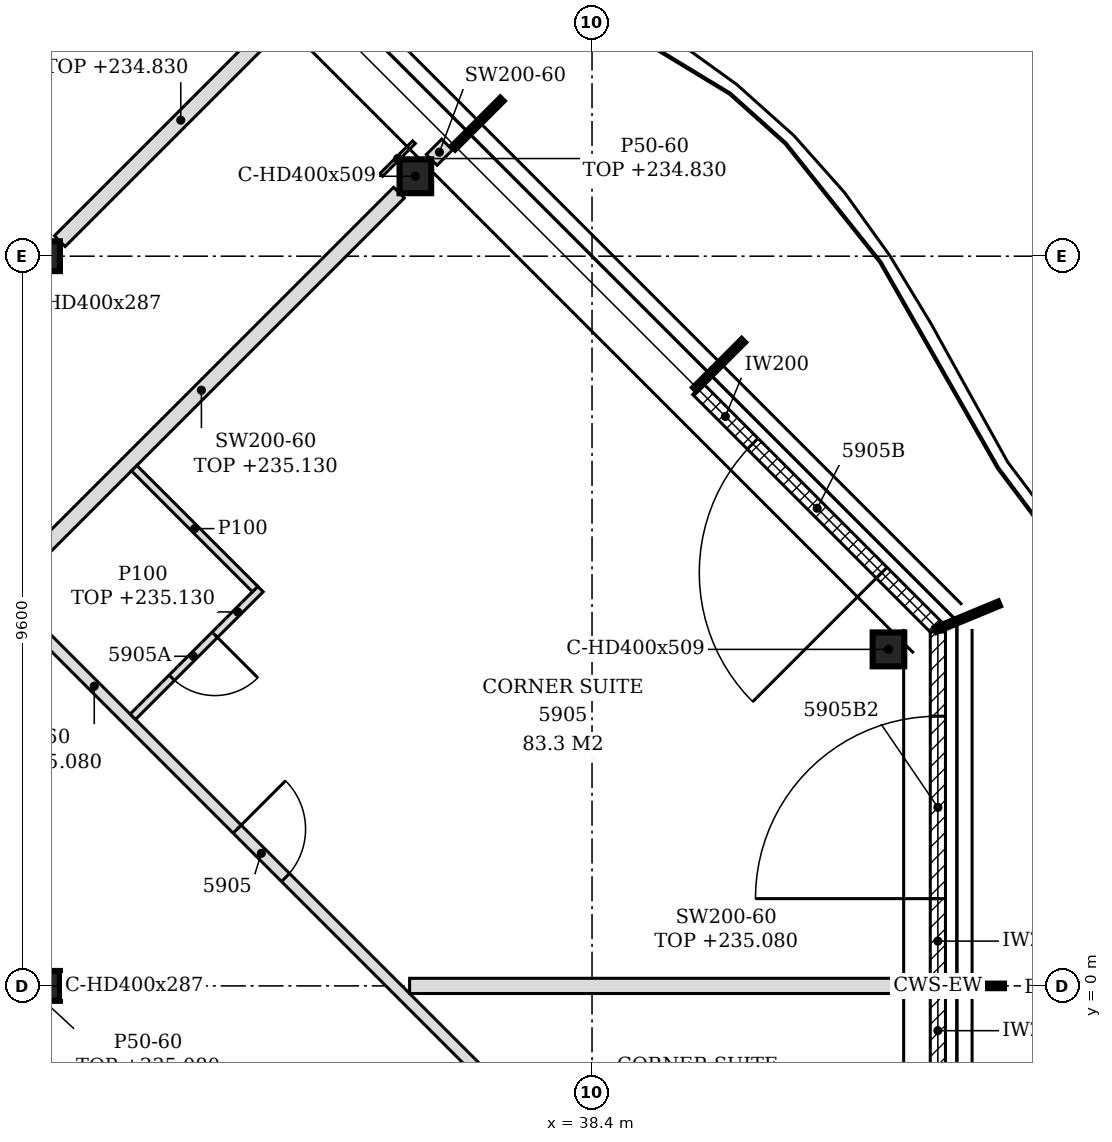
"""IFC4 building model, lengths in metres.
Left out: names, types, materials, properties, quantities, classifications, styles, units other than length and angle.
Written with IfcOpenShell. Run it as: python <this file> out.ifc"""

import sys

from ifc_helpers import new_model, si_unit, direction, frame, frame_2d, origin, origin_2d, place, context, subcontext, project, spatial, rectangle, i_section, extrude, element, fill, save


model = new_model("IFC4")
c1 = context("Model", 3, precision=1e-05, world=origin(), true_north=direction((0.0, 1.0)))
c2 = subcontext(c1, "Body", "Model", "MODEL_VIEW")
j1 = project(units=[si_unit("LENGTHUNIT", "METRE"), si_unit("PLANEANGLEUNIT", "RADIAN")], contexts=[c1])
p1 = place(None, origin())
s1 = spatial("IfcSite", under=j1, at=p1, CompositionType="ELEMENT")
p2 = place(p1, origin())
s2 = spatial("IfcBuilding", under=s1, at=p2, CompositionType="ELEMENT")
p3 = place(p2, frame((0.0, 0.0, 232.2)))
s3 = spatial("IfcBuildingStorey", under=s2, at=p3, CompositionType="ELEMENT", Elevation=232.2)
for number, where, z_axis, x_axis in (
    (1, (42.3, 4.427, -0.15), (0.0, 0.0, 1.0), (1.0, 0.0, 0.0)),
    (2, (36.076, 10.652, -0.15), (0.0, 0.0, 1.0), (1.0, 0.0, 0.0)),
):
    element("IfcColumn", number, at=place(p3, frame(where, z_axis=z_axis, x_axis=x_axis)), inside=s3, PredefinedType="COLUMN", context=c2, shape_type="SweptSolid", body=[
        extrude(i_section(OverallWidth=0.416, OverallDepth=0.446, WebThickness=0.039, FlangeThickness=0.063, FilletRadius=0.015, at=origin_2d()), origin(), (0.0, 0.0, 1.0), 3.6),
    ])
for number, where, z_axis, x_axis in (
    (3, (31.2, 0.0, -0.15), (0.0, 0.0, 1.0), (1.0, 0.0, 0.0)),
    (4, (31.2, 9.6, -0.15), (0.0, 0.0, 1.0), (1.0, 0.0, 0.0)),
):
    element("IfcColumn", number, at=place(p3, frame(where, z_axis=z_axis, x_axis=x_axis)), inside=s3, PredefinedType="COLUMN", context=c2, shape_type="SweptSolid", body=[
        extrude(i_section(OverallWidth=0.399, OverallDepth=0.393, WebThickness=0.023, FlangeThickness=0.037, FilletRadius=0.015, at=origin_2d()), origin(), (0.0, 0.0, 1.0), 3.6),
    ])
p4 = place(p3, frame((42.95, -4.656, 0.0), z_axis=(0.0, 0.0, 1.0), x_axis=(0.0, 1.0, 0.0)))
e5 = element("IfcWall", 5, at=p4, inside=s3, PredefinedType="NOTDEFINED", context=c2, shape_type="SweptSolid", body=[
    extrude(rectangle(XDim=4.626, YDim=0.2, at=frame_2d((2.313, 0.0))), origin(), (0.0, 0.0, 1.0), 3.45),
])
p5 = place(p4, frame((1.108, 0.0, 0.0)))
e6 = element("IfcOpeningElement", 6, at=p5, cuts=e5, PredefinedType="OPENING", context=c2, shape_type="SweptSolid", body=[
    extrude(rectangle(XDim=2.4, YDim=2.4, at=frame_2d((1.2, 1.2))), frame((0.0, 0.11, 0.0), z_axis=(0.0, -1.0, 0.0), x_axis=(1.0, 0.0, 0.0)), (0.0, 0.0, 1.0), 0.22),
])
p6 = place(p3, frame((42.95, 0.03, 0.0), z_axis=(0.0, 0.0, 1.0), x_axis=(0.0, 1.0, 0.0)))
e7 = element("IfcWall", 7, at=p6, inside=s3, PredefinedType="NOTDEFINED", context=c2, shape_type="SweptSolid", body=[
    extrude(rectangle(XDim=4.626, YDim=0.2, at=frame_2d((2.313, 0.0))), origin(), (0.0, 0.0, 1.0), 3.45),
])
p7 = place(p6, frame((1.118, 0.0, 0.0)))
e8 = element("IfcOpeningElement", 8, at=p7, cuts=e7, PredefinedType="OPENING", context=c2, shape_type="SweptSolid", body=[
    extrude(rectangle(XDim=2.4, YDim=2.4, at=frame_2d((1.2, 1.2))), frame((0.0, 0.11, 0.0), z_axis=(0.0, -1.0, 0.0), x_axis=(1.0, 0.0, 0.0)), (0.0, 0.0, 1.0), 0.22),
])
p8 = place(p3, frame((42.922, 4.725, 0.0), z_axis=(0.0, 0.0, 1.0), x_axis=(-0.707079168996, 0.707134392299, 0.0)))
e9 = element("IfcWall", 9, at=p8, inside=s3, PredefinedType="NOTDEFINED", context=c2, shape_type="SweptSolid", body=[
    extrude(rectangle(XDim=4.421, YDim=0.2, at=frame_2d((2.21, 0.0))), origin(), (0.0, 0.0, 1.0), 3.45),
])
p9 = place(p8, frame((1.005, 0.0, 0.0)))
e10 = element("IfcOpeningElement", 10, at=p9, cuts=e9, PredefinedType="OPENING", context=c2, shape_type="SweptSolid", body=[
    extrude(rectangle(XDim=2.4, YDim=2.4, at=frame_2d((1.2, 1.2))), frame((0.0, 0.11, 0.0), z_axis=(0.0, -1.0, 0.0), x_axis=(1.0, 0.0, 0.0)), (0.0, 0.0, 1.0), 0.22),
])
p10 = place(p3, frame((37.072, -1.278, 0.0), z_axis=(0.0, 0.0, 1.0), x_axis=(-0.707106781187, 0.707106781187, 0.0)))
e11 = element("IfcWall", 11, at=p10, inside=s3, PredefinedType="PARTITIONING", context=c2, shape_type="SweptSolid", body=[
    extrude(rectangle(XDim=20.294, YDim=0.15, at=frame_2d((10.147, 0.0))), origin(), (0.0, 0.0, 1.0), 2.88),
])
p11 = place(p10, frame((3.824, 0.0, 0.0)))
e12 = element("IfcOpeningElement", 12, at=p11, cuts=e11, PredefinedType="OPENING", context=c2, shape_type="SweptSolid", body=[
    extrude(rectangle(XDim=0.9, YDim=2.1, at=frame_2d((0.45, 1.05))), frame((0.0, 0.085, 0.0), z_axis=(0.0, -1.0, 0.0), x_axis=(1.0, 0.0, 0.0)), (0.0, 0.0, 1.0), 0.17),
])
p12 = place(p10, frame((10.042, 0.0, 0.0)))
e13 = element("IfcOpeningElement", 13, at=p12, cuts=e11, PredefinedType="OPENING", context=c2, shape_type="SweptSolid", body=[
    extrude(rectangle(XDim=0.9, YDim=2.1, at=frame_2d((0.45, 1.05))), frame((0.0, 0.085, 0.0), z_axis=(0.0, -1.0, 0.0), x_axis=(1.0, 0.0, 0.0)), (0.0, 0.0, 1.0), 0.17),
])
p13 = place(p10, frame((14.443, 0.0, 0.0)))
e14 = element("IfcOpeningElement", 14, at=p13, cuts=e11, PredefinedType="OPENING", context=c2, shape_type="SweptSolid", body=[
    extrude(rectangle(XDim=0.9, YDim=2.1, at=frame_2d((0.45, 1.05))), frame((0.0, 0.085, 0.0), z_axis=(0.0, -1.0, 0.0), x_axis=(1.0, 0.0, 0.0)), (0.0, 0.0, 1.0), 0.17),
])
p14 = place(p3, frame((36.0, 0.0, 0.0), z_axis=(0.0, 0.0, 1.0), x_axis=(1.0, 0.0, 0.0)))
e15 = element("IfcWall", 15, at=p14, inside=s3, PredefinedType="PARTITIONING", context=c2, shape_type="SweptSolid", body=[
    extrude(rectangle(XDim=6.85, YDim=0.2, at=frame_2d((3.425, 0.0))), origin(), (0.0, 0.0, 1.0), 2.88),
])
p15 = place(p3, frame((32.359, 3.541, 0.0), z_axis=(0.0, 0.0, 1.0), x_axis=(0.707158179099, 0.707055379538, 0.0)))
e16 = element("IfcWall", 16, at=p15, inside=s3, PredefinedType="PARTITIONING", context=c2, shape_type="SweptSolid", body=[
    extrude(rectangle(XDim=2.375, YDim=0.1, at=frame_2d((1.188, 0.0))), origin(), (0.0, 0.0, 1.0), 2.93),
])
p16 = place(p15, frame((0.725, 0.0, 0.0)))
e17 = element("IfcOpeningElement", 17, at=p16, cuts=e16, PredefinedType="OPENING", context=c2, shape_type="SweptSolid", body=[
    extrude(rectangle(XDim=0.8, YDim=2.1, at=frame_2d((0.4, 1.05))), frame((0.0, 0.06, 0.0), z_axis=(0.0, -1.0, 0.0), x_axis=(1.0, 0.0, 0.0)), (0.0, 0.0, 1.0), 0.12),
])
p17 = place(p3, frame((30.662, 5.238, 0.0), z_axis=(0.0, 0.0, 1.0), x_axis=(0.707106781187, 0.707106781187, 0.0)))
e18 = element("IfcWall", 18, at=p17, inside=s3, PredefinedType="PARTITIONING", context=c2, shape_type="SweptSolid", body=[
    extrude(rectangle(XDim=7.351, YDim=0.2, at=frame_2d((3.676, 0.0))), origin(), (0.0, 0.0, 1.0), 2.93),
])
p18 = place(p3, frame((33.968, 5.22, 0.0), z_axis=(0.0, 0.0, 1.0), x_axis=(-0.707106781187, 0.707106781187, 0.0)))
e19 = element("IfcWall", 19, at=p18, inside=s3, PredefinedType="PARTITIONING", context=c2, shape_type="SweptSolid", body=[
    extrude(rectangle(XDim=2.25, YDim=0.1, at=frame_2d((1.125, 0.0))), origin(), (0.0, 0.0, 1.0), 3.45),
])
p19 = place(p3, frame((31.398, 9.798, 0.0), z_axis=(0.0, 0.0, 1.0), x_axis=(0.707133900936, 0.707079660397, 0.0)))
e20 = element("IfcWall", 20, at=p19, inside=s3, PredefinedType="PARTITIONING", context=c2, shape_type="SweptSolid", body=[
    extrude(rectangle(XDim=4.501, YDim=0.2, at=frame_2d((2.25, 0.0))), origin(), (0.0, 0.0, 1.0), 2.63),
])
p20 = place(p3, frame((36.291, 10.867, 0.0), z_axis=(0.0, 0.0, 1.0), x_axis=(0.707534423513, 0.706678880075, 0.0)))
e21 = element("IfcWall", 21, at=p20, inside=s3, PredefinedType="PARTITIONING", context=c2, shape_type="SweptSolid", body=[
    extrude(rectangle(XDim=0.285, YDim=0.2, at=frame_2d((0.143, 0.0))), origin(), (0.0, 0.0, 1.0), 3.45),
])
p21 = place(p3, frame((35.627, 10.669, 0.0), z_axis=(0.0, 0.0, 1.0), x_axis=(0.707307009627, 0.706906496032, 0.0)))
e22 = element("IfcWall", 22, at=p21, inside=s3, PredefinedType="PARTITIONING", context=c2, shape_type="SweptSolid", body=[
    extrude(rectangle(XDim=0.61, YDim=0.05, at=frame_2d((0.305, 0.0))), origin(), (0.0, 0.0, 1.0), 2.63),
])
p22 = place(p7, origin())
e23 = element("IfcDoor", 23, at=p22, inside=s3, OperationType="SINGLE_SWING_LEFT", PredefinedType="DOOR", context=c2, shape_type="SweptSolid", body=[
    extrude(rectangle(XDim=2.4, YDim=2.4, at=frame_2d((1.2, 1.2))), frame((0.0, 0.025, 0.0), z_axis=(0.0, -1.0, 0.0), x_axis=(1.0, 0.0, 0.0)), (0.0, 0.0, 1.0), 0.05),
])
fill(e8, e23)
p23 = place(p9, origin())
e24 = element("IfcDoor", 24, at=p23, inside=s3, OperationType="SINGLE_SWING_LEFT", PredefinedType="DOOR", context=c2, shape_type="SweptSolid", body=[
    extrude(rectangle(XDim=2.4, YDim=2.4, at=frame_2d((1.2, 1.2))), frame((0.0, 0.025, 0.0), z_axis=(0.0, -1.0, 0.0), x_axis=(1.0, 0.0, 0.0)), (0.0, 0.0, 1.0), 0.05),
])
fill(e10, e24)
p24 = place(p11, frame((0.9, 0.0, 0.0), z_axis=(0.0, 0.0, 1.0), x_axis=(-1.0, 0.0, 0.0)))
e25 = element("IfcDoor", 25, at=p24, inside=s3, OperationType="SINGLE_SWING_LEFT", PredefinedType="DOOR", context=c2, shape_type="SweptSolid", body=[
    extrude(rectangle(XDim=0.9, YDim=2.1, at=frame_2d((0.45, 1.05))), frame((0.0, 0.025, 0.0), z_axis=(0.0, -1.0, 0.0), x_axis=(1.0, 0.0, 0.0)), (0.0, 0.0, 1.0), 0.05),
])
fill(e12, e25)
p25 = place(p16, frame((0.8, 0.0, 0.0), z_axis=(0.0, 0.0, 1.0), x_axis=(-1.0, 0.0, 0.0)))
e26 = element("IfcDoor", 26, at=p25, inside=s3, OperationType="SINGLE_SWING_LEFT", PredefinedType="DOOR", context=c2, shape_type="SweptSolid", body=[
    extrude(rectangle(XDim=0.8, YDim=2.1, at=frame_2d((0.4, 1.05))), frame((0.0, 0.025, 0.0), z_axis=(0.0, -1.0, 0.0), x_axis=(1.0, 0.0, 0.0)), (0.0, 0.0, 1.0), 0.05),
])
fill(e17, e26)
save(model, sys.argv[1])
